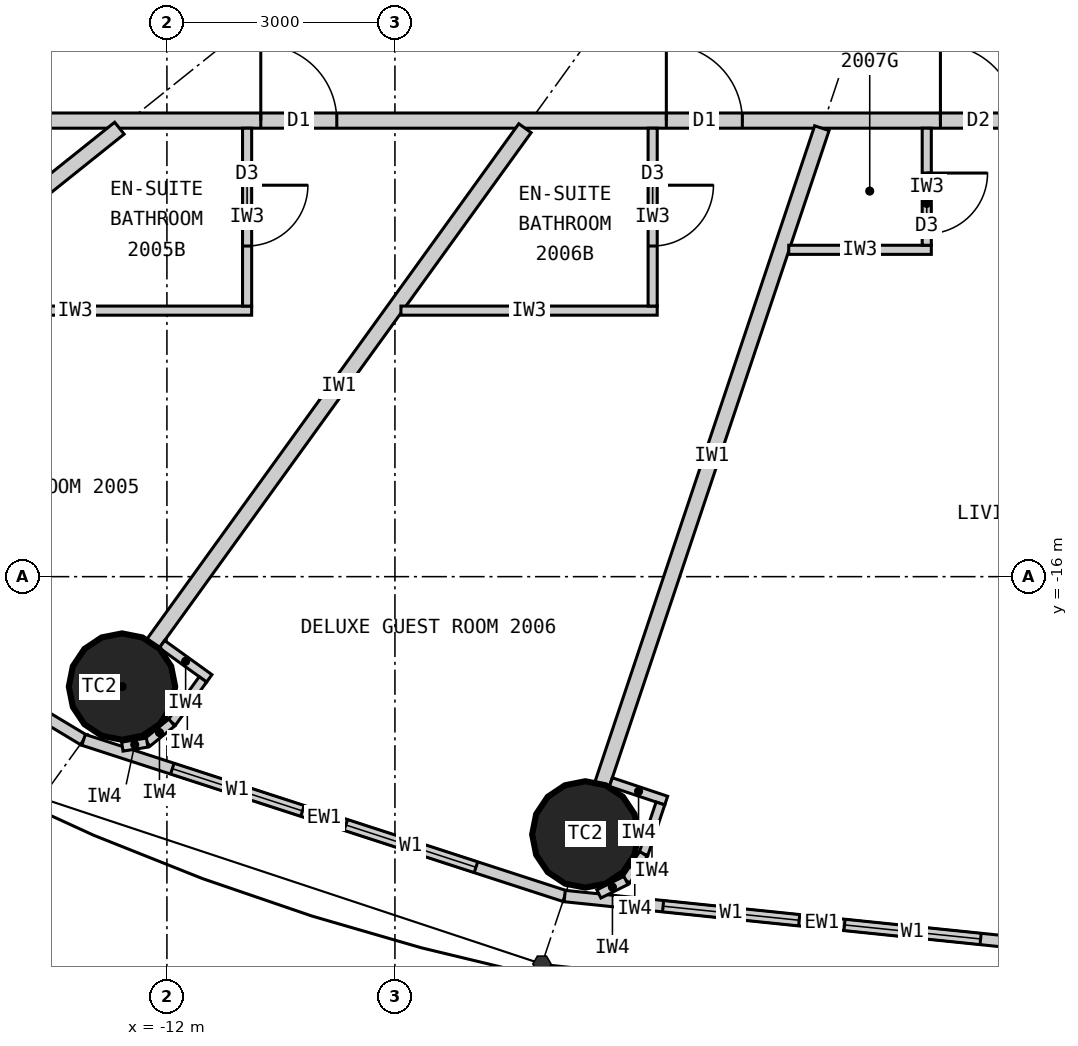
"""IFC4 building model, lengths in metres.
Left out: names, types, materials, properties, quantities, classifications, styles, units other than length and angle.
Written with IfcOpenShell. Run it as: python <this file> out.ifc"""

import sys

from ifc_helpers import new_model, si_unit, direction, frame, frame_2d, origin, origin_2d, place, context, subcontext, project, spatial, rectangle, circle, extrude, element, fill, save


model = new_model("IFC4")
c1 = context("Model", 3, precision=1e-05, world=origin(), true_north=direction((0.0, 1.0)))
c2 = subcontext(c1, "Body", "Model", "MODEL_VIEW")
j1 = project(units=[si_unit("LENGTHUNIT", "METRE"), si_unit("PLANEANGLEUNIT", "RADIAN")], contexts=[c1])
p1 = place(None, origin())
s1 = spatial("IfcSite", under=j1, at=p1, CompositionType="ELEMENT")
p2 = place(p1, origin())
s2 = spatial("IfcBuilding", under=s1, at=p2, CompositionType="ELEMENT")
p3 = place(p2, frame((0.0, 0.0, 80.4)))
s3 = spatial("IfcBuildingStorey", under=s2, at=p3, CompositionType="ELEMENT", Elevation=80.4)
for number, where, z_axis, x_axis in (
    (1, (-12.591, -17.447, 0.0), (0.0, 0.0, 1.0), (1.0, 0.0, 0.0)),
    (2, (-6.495, -19.391, 0.0), (0.0, 0.0, 1.0), (1.0, 0.0, 0.0)),
):
    element("IfcColumn", number, at=place(p3, frame(where, z_axis=z_axis, x_axis=x_axis)), inside=s3, PredefinedType="COLUMN", context=c2, shape_type="SweptSolid", body=[
        extrude(circle(Radius=0.7, at=origin_2d()), origin(), (0.0, 0.0, 1.0), 3.3),
    ])
p4 = place(p3, frame((-18.57, -14.856, 0.0), z_axis=(0.0, 0.0, 1.0), x_axis=(0.856983180864, -0.515344377787, 0.0)))
e3 = element("IfcWall", 3, at=p4, inside=s3, PredefinedType="ELEMENTEDWALL", context=c2, shape_type="SweptSolid", body=[
    extrude(rectangle(XDim=6.386, YDim=0.15, at=frame_2d((3.193, 0.0))), origin(), (0.0, 0.0, 1.0), 3.12),
])
p5 = place(p4, frame((1.093, 0.0, 0.9)))
e4 = element("IfcOpeningElement", 4, at=p5, cuts=e3, PredefinedType="OPENING", context=c2, shape_type="SweptSolid", body=[
    extrude(rectangle(XDim=1.8, YDim=1.9, at=frame_2d((0.9, 0.95))), frame((0.0, 0.085, 0.0), z_axis=(0.0, -1.0, 0.0), x_axis=(1.0, 0.0, 0.0)), (0.0, 0.0, 1.0), 0.17),
])
p6 = place(p4, frame((3.493, 0.0, 0.9)))
e5 = element("IfcOpeningElement", 5, at=p6, cuts=e3, PredefinedType="OPENING", context=c2, shape_type="SweptSolid", body=[
    extrude(rectangle(XDim=1.8, YDim=1.9, at=frame_2d((0.9, 0.95))), frame((0.0, 0.085, 0.0), z_axis=(0.0, -1.0, 0.0), x_axis=(1.0, 0.0, 0.0)), (0.0, 0.0, 1.0), 0.17),
])
p7 = place(p3, frame((-13.096, -18.147, 0.0), z_axis=(0.0, 0.0, 1.0), x_axis=(0.951137534625, -0.308767534285, 0.0)))
e6 = element("IfcWall", 6, at=p7, inside=s3, PredefinedType="ELEMENTEDWALL", context=c2, shape_type="SweptSolid", body=[
    extrude(rectangle(XDim=6.655, YDim=0.15, at=frame_2d((3.328, 0.0))), origin(), (0.0, 0.0, 1.0), 3.12),
])
p8 = place(p7, frame((1.228, 0.0, 0.9)))
e7 = element("IfcOpeningElement", 7, at=p8, cuts=e6, PredefinedType="OPENING", context=c2, shape_type="SweptSolid", body=[
    extrude(rectangle(XDim=1.8, YDim=1.9, at=frame_2d((0.9, 0.95))), frame((0.0, 0.085, 0.0), z_axis=(0.0, -1.0, 0.0), x_axis=(1.0, 0.0, 0.0)), (0.0, 0.0, 1.0), 0.17),
])
p9 = place(p7, frame((3.628, 0.0, 0.9)))
e8 = element("IfcOpeningElement", 8, at=p9, cuts=e6, PredefinedType="OPENING", context=c2, shape_type="SweptSolid", body=[
    extrude(rectangle(XDim=1.8, YDim=1.9, at=frame_2d((0.9, 0.95))), frame((0.0, 0.085, 0.0), z_axis=(0.0, -1.0, 0.0), x_axis=(1.0, 0.0, 0.0)), (0.0, 0.0, 1.0), 0.17),
])
p10 = place(p3, frame((-6.766, -20.202, 0.0), z_axis=(0.0, 0.0, 1.0), x_axis=(0.994721394369, -0.102612609291, 0.0)))
e9 = element("IfcWall", 9, at=p10, inside=s3, PredefinedType="ELEMENTEDWALL", context=c2, shape_type="SweptSolid", body=[
    extrude(rectangle(XDim=6.802, YDim=0.15, at=frame_2d((3.401, 0.0))), origin(), (0.0, 0.0, 1.0), 3.12),
])
p11 = place(p10, frame((1.301, 0.0, 0.9)))
e10 = element("IfcOpeningElement", 10, at=p11, cuts=e9, PredefinedType="OPENING", context=c2, shape_type="SweptSolid", body=[
    extrude(rectangle(XDim=1.8, YDim=1.9, at=frame_2d((0.9, 0.95))), frame((0.0, 0.085, 0.0), z_axis=(0.0, -1.0, 0.0), x_axis=(1.0, 0.0, 0.0)), (0.0, 0.0, 1.0), 0.17),
])
p12 = place(p10, frame((3.701, 0.0, 0.9)))
e11 = element("IfcOpeningElement", 11, at=p12, cuts=e9, PredefinedType="OPENING", context=c2, shape_type="SweptSolid", body=[
    extrude(rectangle(XDim=1.8, YDim=1.9, at=frame_2d((0.9, 0.95))), frame((0.0, 0.085, 0.0), z_axis=(0.0, -1.0, 0.0), x_axis=(1.0, 0.0, 0.0)), (0.0, 0.0, 1.0), 0.17),
])
p13 = place(p3, frame((14.1, -10.0, 0.0), z_axis=(0.0, 0.0, 1.0), x_axis=(-1.0, 0.0, 0.0)))
e12 = element("IfcWall", 12, at=p13, inside=s3, PredefinedType="PARTITIONING", context=c2, shape_type="SweptSolid", body=[
    extrude(rectangle(XDim=28.2, YDim=0.2, at=frame_2d((14.1, 0.0))), origin(), (0.0, 0.0, 1.0), 3.12),
])
p14 = place(p13, frame((23.865, 0.0, 0.0)))
e13 = element("IfcOpeningElement", 13, at=p14, cuts=e12, PredefinedType="OPENING", context=c2, shape_type="SweptSolid", body=[
    extrude(rectangle(XDim=1.0, YDim=2.2, at=frame_2d((0.5, 1.1))), frame((0.0, 0.11, 0.0), z_axis=(0.0, -1.0, 0.0), x_axis=(1.0, 0.0, 0.0)), (0.0, 0.0, 1.0), 0.22),
])
p15 = place(p13, frame((18.529, 0.0, 0.0)))
e14 = element("IfcOpeningElement", 14, at=p15, cuts=e12, PredefinedType="OPENING", context=c2, shape_type="SweptSolid", body=[
    extrude(rectangle(XDim=1.0, YDim=2.2, at=frame_2d((0.5, 1.1))), frame((0.0, 0.11, 0.0), z_axis=(0.0, -1.0, 0.0), x_axis=(1.0, 0.0, 0.0)), (0.0, 0.0, 1.0), 0.22),
])
p16 = place(p13, frame((14.923, 0.0, 0.0)))
e15 = element("IfcOpeningElement", 15, at=p16, cuts=e12, PredefinedType="OPENING", context=c2, shape_type="SweptSolid", body=[
    extrude(rectangle(XDim=1.0, YDim=2.2, at=frame_2d((0.5, 1.1))), frame((0.0, 0.11, 0.0), z_axis=(0.0, -1.0, 0.0), x_axis=(1.0, 0.0, 0.0)), (0.0, 0.0, 1.0), 0.22),
])
p17 = place(p13, frame((2.801, 0.0, 0.0)))
e16 = element("IfcOpeningElement", 16, at=p17, cuts=e12, PredefinedType="OPENING", context=c2, shape_type="SweptSolid", body=[
    extrude(rectangle(XDim=1.0, YDim=2.2, at=frame_2d((0.5, 1.1))), frame((0.0, 0.11, 0.0), z_axis=(0.0, -1.0, 0.0), x_axis=(1.0, 0.0, 0.0)), (0.0, 0.0, 1.0), 0.22),
])
p18 = place(p3, frame((-12.625, -10.1, 0.0), z_axis=(0.0, 0.0, 1.0), x_axis=(-0.780892451574, -0.624665493744, 0.0)))
e17 = element("IfcWall", 17, at=p18, inside=s3, PredefinedType="PARTITIONING", context=c2, shape_type="SweptSolid", body=[
    extrude(rectangle(XDim=6.045, YDim=0.2, at=frame_2d((3.022, 0.0))), origin(), (0.0, 0.0, 1.0), 2.32),
])
p19 = place(p3, frame((-7.289, -10.1, 0.0), z_axis=(0.0, 0.0, 1.0), x_axis=(-0.585198353053, -0.810890182197, 0.0)))
e18 = element("IfcWall", 18, at=p19, inside=s3, PredefinedType="PARTITIONING", context=c2, shape_type="SweptSolid", body=[
    extrude(rectangle(XDim=8.36, YDim=0.2, at=frame_2d((4.18, 0.0))), origin(), (0.0, 0.0, 1.0), 2.32),
])
p20 = place(p3, frame((-3.383, -10.1, 0.0), z_axis=(0.0, 0.0, 1.0), x_axis=(-0.31759592231, -0.948226149256, 0.0)))
e19 = element("IfcWall", 19, at=p20, inside=s3, PredefinedType="PARTITIONING", context=c2, shape_type="SweptSolid", body=[
    extrude(rectangle(XDim=9.098, YDim=0.2, at=frame_2d((4.549, 0.0))), origin(), (0.0, 0.0, 1.0), 2.32),
])
p21 = place(p3, frame((-15.525, -12.5, 0.0), z_axis=(0.0, 0.0, 1.0), x_axis=(1.0, 0.0, 0.0)))
e20 = element("IfcWall", 20, at=p21, inside=s3, PredefinedType="PARTITIONING", context=c2, shape_type="SweptSolid", body=[
    extrude(rectangle(XDim=4.64, YDim=0.12, at=frame_2d((2.32, 0.0))), origin(), (0.0, 0.0, 1.0), 3.12),
])
p22 = place(p3, frame((-10.945, -10.1, 0.0), z_axis=(0.0, 0.0, 1.0), x_axis=(0.0, -1.0, 0.0)))
e21 = element("IfcWall", 21, at=p22, inside=s3, PredefinedType="PARTITIONING", context=c2, shape_type="SweptSolid", body=[
    extrude(rectangle(XDim=2.34, YDim=0.12, at=frame_2d((1.17, 0.0))), origin(), (0.0, 0.0, 1.0), 3.12),
])
p23 = place(p22, frame((0.75, 0.0, 0.0)))
e22 = element("IfcOpeningElement", 22, at=p23, cuts=e21, PredefinedType="OPENING", context=c2, shape_type="SweptSolid", body=[
    extrude(rectangle(XDim=0.8, YDim=2.1, at=frame_2d((0.4, 1.05))), frame((0.0, 0.07, 0.0), z_axis=(0.0, -1.0, 0.0), x_axis=(1.0, 0.0, 0.0)), (0.0, 0.0, 1.0), 0.14),
])
p24 = place(p3, frame((-8.921, -12.5, 0.0), z_axis=(0.0, 0.0, 1.0), x_axis=(1.0, 0.0, 0.0)))
e23 = element("IfcWall", 23, at=p24, inside=s3, PredefinedType="PARTITIONING", context=c2, shape_type="SweptSolid", body=[
    extrude(rectangle(XDim=3.372, YDim=0.12, at=frame_2d((1.686, 0.0))), origin(), (0.0, 0.0, 1.0), 3.12),
])
p25 = place(p3, frame((-5.609, -10.1, 0.0), z_axis=(0.0, 0.0, 1.0), x_axis=(0.0, -1.0, 0.0)))
e24 = element("IfcWall", 24, at=p25, inside=s3, PredefinedType="PARTITIONING", context=c2, shape_type="SweptSolid", body=[
    extrude(rectangle(XDim=2.34, YDim=0.12, at=frame_2d((1.17, 0.0))), origin(), (0.0, 0.0, 1.0), 3.12),
])
p26 = place(p25, frame((0.75, 0.0, 0.0)))
e25 = element("IfcOpeningElement", 25, at=p26, cuts=e24, PredefinedType="OPENING", context=c2, shape_type="SweptSolid", body=[
    extrude(rectangle(XDim=0.8, YDim=2.1, at=frame_2d((0.4, 1.05))), frame((0.0, 0.07, 0.0), z_axis=(0.0, -1.0, 0.0), x_axis=(1.0, 0.0, 0.0)), (0.0, 0.0, 1.0), 0.14),
])
p27 = place(p3, frame((-3.819, -11.7, 0.0), z_axis=(0.0, 0.0, 1.0), x_axis=(1.0, 0.0, 0.0)))
e26 = element("IfcWall", 26, at=p27, inside=s3, PredefinedType="PARTITIONING", context=c2, shape_type="SweptSolid", body=[
    extrude(rectangle(XDim=1.876, YDim=0.12, at=frame_2d((0.938, 0.0))), origin(), (0.0, 0.0, 1.0), 3.12),
])
p28 = place(p3, frame((-2.003, -10.1, 0.0), z_axis=(0.0, 0.0, 1.0), x_axis=(0.0, -1.0, 0.0)))
e27 = element("IfcWall", 27, at=p28, inside=s3, PredefinedType="PARTITIONING", context=c2, shape_type="SweptSolid", body=[
    extrude(rectangle(XDim=1.54, YDim=0.12, at=frame_2d((0.77, 0.0))), origin(), (0.0, 0.0, 1.0), 3.12),
])
p29 = place(p28, frame((0.59, 0.0, 0.0)))
e28 = element("IfcOpeningElement", 28, at=p29, cuts=e27, PredefinedType="OPENING", context=c2, shape_type="SweptSolid", body=[
    extrude(rectangle(XDim=0.8, YDim=2.1, at=frame_2d((0.4, 1.05))), frame((0.0, 0.07, 0.0), z_axis=(0.0, -1.0, 0.0), x_axis=(1.0, 0.0, 0.0)), (0.0, 0.0, 1.0), 0.14),
])
p30 = place(p3, frame((-12.065, -16.889, 0.0), z_axis=(0.0, 0.0, 1.0), x_axis=(0.810821798253, -0.585293098778, 0.0)))
e29 = element("IfcWall", 29, at=p30, inside=s3, PredefinedType="PARTITIONING", context=c2, shape_type="SweptSolid", body=[
    extrude(rectangle(XDim=0.768, YDim=0.12, at=frame_2d((0.384, 0.0))), origin(), (0.0, 0.0, 1.0), 3.12),
])
p31 = place(p3, frame((-11.526, -17.351, 0.0), z_axis=(0.0, 0.0, 1.0), x_axis=(-0.585223113993, -0.810872312296, 0.0)))
e30 = element("IfcWall", 30, at=p31, inside=s3, PredefinedType="PARTITIONING", context=c2, shape_type="SweptSolid", body=[
    extrude(rectangle(XDim=0.7, YDim=0.12, at=frame_2d((0.35, 0.0))), origin(), (0.0, 0.0, 1.0), 3.12),
])
p32 = place(p3, frame((-11.936, -17.919, 0.0), z_axis=(0.0, 0.0, 1.0), x_axis=(-0.775023088441, -0.631932917629, 0.0)))
e31 = element("IfcWall", 31, at=p32, inside=s3, PredefinedType="PARTITIONING", context=c2, shape_type="SweptSolid", body=[
    extrude(rectangle(XDim=0.418, YDim=0.12, at=frame_2d((0.209, 0.0))), origin(), (0.0, 0.0, 1.0), 3.12),
])
p33 = place(p3, frame((-12.26, -18.183, 0.0), z_axis=(0.0, 0.0, 1.0), x_axis=(-0.987218661664, -0.159371622511, 0.0)))
e32 = element("IfcWall", 32, at=p33, inside=s3, PredefinedType="PARTITIONING", context=c2, shape_type="SweptSolid", body=[
    extrude(rectangle(XDim=0.331, YDim=0.12, at=frame_2d((0.166, 0.0))), origin(), (0.0, 0.0, 1.0), 3.12),
])
p34 = place(p3, frame((-6.159, -18.702, 0.0), z_axis=(0.0, 0.0, 1.0), x_axis=(0.948173154049, -0.31775410295, 0.0)))
e33 = element("IfcWall", 33, at=p34, inside=s3, PredefinedType="PARTITIONING", context=c2, shape_type="SweptSolid", body=[
    extrude(rectangle(XDim=0.768, YDim=0.12, at=frame_2d((0.384, 0.0))), origin(), (0.0, 0.0, 1.0), 3.12),
])
p35 = place(p3, frame((-5.507, -18.984, 0.0), z_axis=(0.0, 0.0, 1.0), x_axis=(-0.317692050622, -0.948193946918, 0.0)))
e34 = element("IfcWall", 34, at=p35, inside=s3, PredefinedType="PARTITIONING", context=c2, shape_type="SweptSolid", body=[
    extrude(rectangle(XDim=0.7, YDim=0.12, at=frame_2d((0.35, 0.0))), origin(), (0.0, 0.0, 1.0), 3.12),
])
p36 = place(p3, frame((-5.729, -19.648, 0.0), z_axis=(0.0, 0.0, 1.0), x_axis=(-0.552135764955, -0.833754218615, 0.0)))
e35 = element("IfcWall", 35, at=p36, inside=s3, PredefinedType="PARTITIONING", context=c2, shape_type="SweptSolid", body=[
    extrude(rectangle(XDim=0.418, YDim=0.12, at=frame_2d((0.209, 0.0))), origin(), (0.0, 0.0, 1.0), 3.12),
])
p37 = place(p3, frame((-5.96, -19.996, 0.0), z_axis=(0.0, 0.0, 1.0), x_axis=(-0.895160725913, -0.445743507842, 0.0)))
e36 = element("IfcWall", 36, at=p37, inside=s3, PredefinedType="PARTITIONING", context=c2, shape_type="SweptSolid", body=[
    extrude(rectangle(XDim=0.399, YDim=0.12, at=frame_2d((0.199, 0.0))), origin(), (0.0, 0.0, 1.0), 3.12),
])
p38 = place(p8, origin())
e37 = element("IfcWindow", 37, at=p38, inside=s3, PartitioningType="SINGLE_PANEL", PredefinedType="WINDOW", context=c2, shape_type="SweptSolid", body=[
    extrude(rectangle(XDim=1.8, YDim=1.9, at=frame_2d((0.9, 0.95))), frame((0.0, 0.03, 0.0), z_axis=(0.0, -1.0, 0.0), x_axis=(1.0, 0.0, 0.0)), (0.0, 0.0, 1.0), 0.06),
])
fill(e7, e37)
p39 = place(p9, origin())
e38 = element("IfcWindow", 38, at=p39, inside=s3, PartitioningType="SINGLE_PANEL", PredefinedType="WINDOW", context=c2, shape_type="SweptSolid", body=[
    extrude(rectangle(XDim=1.8, YDim=1.9, at=frame_2d((0.9, 0.95))), frame((0.0, 0.03, 0.0), z_axis=(0.0, -1.0, 0.0), x_axis=(1.0, 0.0, 0.0)), (0.0, 0.0, 1.0), 0.06),
])
fill(e8, e38)
p40 = place(p11, origin())
e39 = element("IfcWindow", 39, at=p40, inside=s3, PartitioningType="SINGLE_PANEL", PredefinedType="WINDOW", context=c2, shape_type="SweptSolid", body=[
    extrude(rectangle(XDim=1.8, YDim=1.9, at=frame_2d((0.9, 0.95))), frame((0.0, 0.03, 0.0), z_axis=(0.0, -1.0, 0.0), x_axis=(1.0, 0.0, 0.0)), (0.0, 0.0, 1.0), 0.06),
])
fill(e10, e39)
p41 = place(p12, origin())
e40 = element("IfcWindow", 40, at=p41, inside=s3, PartitioningType="SINGLE_PANEL", PredefinedType="WINDOW", context=c2, shape_type="SweptSolid", body=[
    extrude(rectangle(XDim=1.8, YDim=1.9, at=frame_2d((0.9, 0.95))), frame((0.0, 0.03, 0.0), z_axis=(0.0, -1.0, 0.0), x_axis=(1.0, 0.0, 0.0)), (0.0, 0.0, 1.0), 0.06),
])
fill(e11, e40)
p42 = place(p23, origin())
e41 = element("IfcDoor", 41, at=p42, inside=s3, OperationType="SINGLE_SWING_LEFT", PredefinedType="DOOR", context=c2, shape_type="SweptSolid", body=[
    extrude(rectangle(XDim=0.8, YDim=2.1, at=frame_2d((0.4, 1.05))), frame((0.0, 0.025, 0.0), z_axis=(0.0, -1.0, 0.0), x_axis=(1.0, 0.0, 0.0)), (0.0, 0.0, 1.0), 0.05),
])
fill(e22, e41)
p43 = place(p14, origin())
e42 = element("IfcDoor", 42, at=p43, inside=s3, OperationType="SINGLE_SWING_RIGHT", PredefinedType="DOOR", context=c2, shape_type="SweptSolid", body=[
    extrude(rectangle(XDim=1.0, YDim=2.2, at=frame_2d((0.5, 1.1))), frame((0.0, 0.025, 0.0), z_axis=(0.0, -1.0, 0.0), x_axis=(1.0, 0.0, 0.0)), (0.0, 0.0, 1.0), 0.05),
])
fill(e13, e42)
p44 = place(p26, origin())
e43 = element("IfcDoor", 43, at=p44, inside=s3, OperationType="SINGLE_SWING_LEFT", PredefinedType="DOOR", context=c2, shape_type="SweptSolid", body=[
    extrude(rectangle(XDim=0.8, YDim=2.1, at=frame_2d((0.4, 1.05))), frame((0.0, 0.025, 0.0), z_axis=(0.0, -1.0, 0.0), x_axis=(1.0, 0.0, 0.0)), (0.0, 0.0, 1.0), 0.05),
])
fill(e25, e43)
p45 = place(p15, origin())
e44 = element("IfcDoor", 44, at=p45, inside=s3, OperationType="SINGLE_SWING_RIGHT", PredefinedType="DOOR", context=c2, shape_type="SweptSolid", body=[
    extrude(rectangle(XDim=1.0, YDim=2.2, at=frame_2d((0.5, 1.1))), frame((0.0, 0.025, 0.0), z_axis=(0.0, -1.0, 0.0), x_axis=(1.0, 0.0, 0.0)), (0.0, 0.0, 1.0), 0.05),
])
fill(e14, e44)
p46 = place(p29, origin())
e45 = element("IfcDoor", 45, at=p46, inside=s3, OperationType="SINGLE_SWING_LEFT", PredefinedType="DOOR", context=c2, shape_type="SweptSolid", body=[
    extrude(rectangle(XDim=0.8, YDim=2.1, at=frame_2d((0.4, 1.05))), frame((0.0, 0.025, 0.0), z_axis=(0.0, -1.0, 0.0), x_axis=(1.0, 0.0, 0.0)), (0.0, 0.0, 1.0), 0.05),
])
fill(e28, e45)
p47 = place(p16, origin())
e46 = element("IfcDoor", 46, at=p47, inside=s3, OperationType="SINGLE_SWING_RIGHT", PredefinedType="DOOR", context=c2, shape_type="SweptSolid", body=[
    extrude(rectangle(XDim=1.0, YDim=2.2, at=frame_2d((0.5, 1.1))), frame((0.0, 0.025, 0.0), z_axis=(0.0, -1.0, 0.0), x_axis=(1.0, 0.0, 0.0)), (0.0, 0.0, 1.0), 0.05),
])
fill(e15, e46)
save(model, sys.argv[1])
